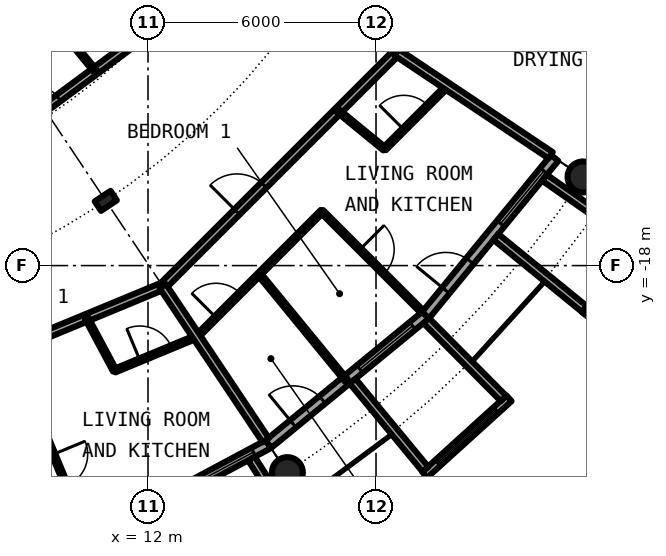
"""IFC4 building model, lengths in metres.
Left out: names, types, materials, properties, quantities, classifications, styles, units other than length and angle.
Written with IfcOpenShell. Run it as: python <this file> out.ifc"""

import sys

from ifc_helpers import new_model, si_unit, direction, frame, frame_2d, origin, origin_2d, place, context, subcontext, project, spatial, rectangle, circle, hollow_circle, i_section, extrude, element, fill, save


model = new_model("IFC4")
c1 = context("Model", 3, precision=1e-05, world=origin(), true_north=direction((0.0, 1.0)))
c2 = subcontext(c1, "Body", "Model", "MODEL_VIEW")
j1 = project(units=[si_unit("LENGTHUNIT", "METRE"), si_unit("PLANEANGLEUNIT", "RADIAN")], contexts=[c1])
p1 = place(None, origin())
s1 = spatial("IfcSite", under=j1, at=p1, CompositionType="ELEMENT")
p2 = place(p1, origin())
s2 = spatial("IfcBuilding", under=s1, at=p2, CompositionType="ELEMENT")
p3 = place(p2, frame((0.0, 0.0, 170.75)))
s3 = spatial("IfcBuildingStorey", under=s2, at=p3, CompositionType="ELEMENT", Elevation=170.75)
for number, where, z_axis, x_axis in (
    (1, (15.667, -23.448, 0.0), (0.0, 0.0, 1.0), (1.0, 0.0, 0.0)),
    (2, (23.448, -15.667, 0.0), (0.0, 0.0, 1.0), (1.0, 0.0, 0.0)),
):
    element("IfcColumn", number, at=place(p3, frame(where, z_axis=z_axis, x_axis=x_axis)), inside=s3, PredefinedType="COLUMN", context=c2, shape_type="SweptSolid", body=[
        extrude(hollow_circle(Radius=0.406, WallThickness=0.04, at=origin_2d()), origin(), (0.0, 0.0, 1.0), 3.05),
    ])
p4 = place(p3, frame((10.889, -16.297, 0.0), z_axis=(0.0, 0.0, 1.0), x_axis=(0.55557023302, -0.831469612303, 0.0)))
e3 = element("IfcColumn", 3, at=p4, inside=s3, PredefinedType="COLUMN", context=c2, shape_type="SweptSolid", body=[
    extrude(i_section(OverallWidth=0.3, OverallDepth=0.5, WebThickness=0.014, FlangeThickness=0.028, FilletRadius=0.027, at=origin_2d()), origin(), (0.0, 0.0, 1.0), 3.05),
])
p5 = place(p3, frame((10.447, -25.222, 0.0), z_axis=(0.0, 0.0, 1.0), x_axis=(0.881915646801, 0.471407246368, 0.0)))
e4 = element("IfcWall", 4, at=p5, inside=s3, PredefinedType="SOLIDWALL", context=c2, shape_type="SweptSolid", body=[
    extrude(rectangle(XDim=5.352, YDim=0.25, at=frame_2d((2.676, 0.0))), origin(), (0.0, 0.0, 1.0), 2.7),
])
p6 = place(p5, frame((0.841, 0.0, 0.0)))
e5 = element("IfcOpeningElement", 5, at=p6, cuts=e4, PredefinedType="OPENING", context=c2, shape_type="SweptSolid", body=[
    extrude(rectangle(XDim=1.0, YDim=2.2, at=frame_2d((0.5, 1.1))), frame((0.0, 0.135, 0.0), z_axis=(0.0, -1.0, 0.0), x_axis=(1.0, 0.0, 0.0)), (0.0, 0.0, 1.0), 0.27),
])
p7 = place(p5, frame((3.111, 0.0, 0.3)))
e6 = element("IfcOpeningElement", 6, at=p7, cuts=e4, PredefinedType="OPENING", context=c2, shape_type="SweptSolid", body=[
    extrude(rectangle(XDim=1.8, YDim=2.1, at=frame_2d((0.9, 1.05))), frame((0.0, 0.135, 0.0), z_axis=(0.0, -1.0, 0.0), x_axis=(1.0, 0.0, 0.0)), (0.0, 0.0, 1.0), 0.27),
])
p8 = place(p3, frame((14.722, -23.079, -0.03), z_axis=(0.0, 0.0, 1.0), x_axis=(0.537572179146, -0.843217737129, 0.0)))
e7 = element("IfcWall", 7, at=p8, inside=s3, PredefinedType="SOLIDWALL", context=c2, shape_type="SweptSolid", body=[
    extrude(rectangle(XDim=2.924, YDim=0.2, at=frame_2d((1.462, 0.0))), origin(), (0.0, 0.0, 1.0), 2.73),
])
p9 = place(p3, frame((15.167, -22.699, 0.0), z_axis=(0.0, 0.0, 1.0), x_axis=(0.773019449054, 0.634382322723, 0.0)))
e8 = element("IfcWall", 8, at=p9, inside=s3, PredefinedType="SOLIDWALL", context=c2, shape_type="SweptSolid", body=[
    extrude(rectangle(XDim=5.352, YDim=0.25, at=frame_2d((2.676, 0.0))), origin(), (0.0, 0.0, 1.0), 2.7),
])
p10 = place(p9, frame((0.841, 0.0, 0.0)))
e9 = element("IfcOpeningElement", 9, at=p10, cuts=e8, PredefinedType="OPENING", context=c2, shape_type="SweptSolid", body=[
    extrude(rectangle(XDim=1.0, YDim=2.2, at=frame_2d((0.5, 1.1))), frame((0.0, 0.135, 0.0), z_axis=(0.0, -1.0, 0.0), x_axis=(1.0, 0.0, 0.0)), (0.0, 0.0, 1.0), 0.27),
])
p11 = place(p9, frame((3.111, 0.0, 0.3)))
e10 = element("IfcOpeningElement", 10, at=p11, cuts=e8, PredefinedType="OPENING", context=c2, shape_type="SweptSolid", body=[
    extrude(rectangle(XDim=1.8, YDim=2.1, at=frame_2d((0.9, 1.05))), frame((0.0, 0.135, 0.0), z_axis=(0.0, -1.0, 0.0), x_axis=(1.0, 0.0, 0.0)), (0.0, 0.0, 1.0), 0.27),
])
p12 = place(p3, frame((19.282, -23.503, -0.03), z_axis=(0.0, 0.0, 1.0), x_axis=(0.740998365753, 0.671506829416, 0.0)))
e11 = element("IfcWall", 11, at=p12, inside=s3, PredefinedType="SOLIDWALL", context=c2, shape_type="SweptSolid", body=[
    extrude(rectangle(XDim=2.993, YDim=0.2, at=frame_2d((1.497, 0.0))), origin(), (0.0, 0.0, 1.0), 2.73),
])
p13 = place(p12, frame((0.457, 0.0, 0.33)))
e12 = element("IfcOpeningElement", 12, at=p13, cuts=e11, PredefinedType="OPENING", context=c2, shape_type="SweptSolid", body=[
    extrude(circle(Radius=1.04, at=frame_2d((1.04, 1.04))), frame((0.0, 0.11, 0.0), z_axis=(0.0, -1.0, 0.0), x_axis=(1.0, 0.0, 0.0)), (0.0, 0.0, 1.0), 0.22),
])
p14 = place(p3, frame((17.384, -21.041, -0.03), z_axis=(0.0, 0.0, 1.0), x_axis=(0.63709551667, -0.770784861449, 0.0)))
e13 = element("IfcWall", 13, at=p14, inside=s3, PredefinedType="SOLIDWALL", context=c2, shape_type="SweptSolid", body=[
    extrude(rectangle(XDim=3.006, YDim=0.2, at=frame_2d((1.503, 0.0))), origin(), (0.0, 0.0, 1.0), 2.73),
])
p15 = place(p3, frame((19.323, -19.45, -0.03), z_axis=(0.0, 0.0, 1.0), x_axis=(0.704476739375, -0.709727076896, 0.0)))
e14 = element("IfcWall", 14, at=p15, inside=s3, PredefinedType="SOLIDWALL", context=c2, shape_type="SweptSolid", body=[
    extrude(rectangle(XDim=2.883, YDim=0.2, at=frame_2d((1.441, 0.0))), origin(), (0.0, 0.0, 1.0), 2.73),
])
p16 = place(p3, frame((19.304, -19.304, 0.0), z_axis=(0.0, 0.0, 1.0), x_axis=(0.634382322723, 0.773019449054, 0.0)))
e15 = element("IfcWall", 15, at=p16, inside=s3, PredefinedType="SOLIDWALL", context=c2, shape_type="SweptSolid", body=[
    extrude(rectangle(XDim=5.352, YDim=0.25, at=frame_2d((2.676, 0.0))), origin(), (0.0, 0.0, 1.0), 2.7),
])
p17 = place(p16, frame((0.841, 0.0, 0.0)))
e16 = element("IfcOpeningElement", 16, at=p17, cuts=e15, PredefinedType="OPENING", context=c2, shape_type="SweptSolid", body=[
    extrude(rectangle(XDim=1.0, YDim=2.2, at=frame_2d((0.5, 1.1))), frame((0.0, 0.135, 0.0), z_axis=(0.0, -1.0, 0.0), x_axis=(1.0, 0.0, 0.0)), (0.0, 0.0, 1.0), 0.27),
])
p18 = place(p16, frame((3.111, 0.0, 0.3)))
e17 = element("IfcOpeningElement", 17, at=p18, cuts=e15, PredefinedType="OPENING", context=c2, shape_type="SweptSolid", body=[
    extrude(rectangle(XDim=1.8, YDim=2.1, at=frame_2d((0.9, 1.05))), frame((0.0, 0.135, 0.0), z_axis=(0.0, -1.0, 0.0), x_axis=(1.0, 0.0, 0.0)), (0.0, 0.0, 1.0), 0.27),
])
p19 = place(p3, frame((23.497, -19.289, -0.03), z_axis=(0.0, 0.0, 1.0), x_axis=(0.602806268067, 0.797887588059, 0.0)))
e18 = element("IfcWall", 18, at=p19, inside=s3, PredefinedType="SOLIDWALL", context=c2, shape_type="SweptSolid", body=[
    extrude(rectangle(XDim=2.447, YDim=0.2, at=frame_2d((1.223, 0.0))), origin(), (0.0, 0.0, 1.0), 2.73),
])
p20 = place(p19, frame((0.183, 0.0, 0.33)))
e19 = element("IfcOpeningElement", 19, at=p20, cuts=e18, PredefinedType="OPENING", context=c2, shape_type="SweptSolid", body=[
    extrude(circle(Radius=1.04, at=frame_2d((1.04, 1.04))), frame((0.0, 0.11, 0.0), z_axis=(0.0, -1.0, 0.0), x_axis=(1.0, 0.0, 0.0)), (0.0, 0.0, 1.0), 0.22),
])
p21 = place(p3, frame((21.155, -17.246, -0.03), z_axis=(0.0, 0.0, 1.0), x_axis=(0.775179004516, -0.631741648902, 0.0)))
e20 = element("IfcWall", 20, at=p21, inside=s3, PredefinedType="SOLIDWALL", context=c2, shape_type="SweptSolid", body=[
    extrude(rectangle(XDim=3.006, YDim=0.2, at=frame_2d((1.503, 0.0))), origin(), (0.0, 0.0, 1.0), 2.73),
])
p22 = place(p3, frame((22.433, -15.688, -0.03), z_axis=(0.0, 0.0, 1.0), x_axis=(0.819373043115, -0.573260687834, 0.0)))
e21 = element("IfcWall", 21, at=p22, inside=s3, PredefinedType="SOLIDWALL", context=c2, shape_type="SweptSolid", body=[
    extrude(rectangle(XDim=2.925, YDim=0.2, at=frame_2d((1.463, 0.0))), origin(), (0.0, 0.0, 1.0), 2.73),
])
p23 = place(p3, frame((11.124, -20.764, 0.0), z_axis=(0.0, 0.0, 1.0), x_axis=(0.923938991376, 0.382539854414, 0.0)))
e22 = element("IfcWall", 22, at=p23, inside=s3, PredefinedType="PARTITIONING", context=c2, shape_type="SweptSolid", body=[
    extrude(rectangle(XDim=2.331, YDim=0.1, at=frame_2d((1.166, 0.0))), origin(), (0.0, 0.0, 1.0), 2.7),
])
p24 = place(p23, frame((0.716, 0.0, 0.0)))
e23 = element("IfcOpeningElement", 23, at=p24, cuts=e22, PredefinedType="OPENING", context=c2, shape_type="SweptSolid", body=[
    extrude(rectangle(XDim=0.9, YDim=2.3, at=frame_2d((0.45, 1.15))), frame((0.0, 0.06, 0.0), z_axis=(0.0, -1.0, 0.0), x_axis=(1.0, 0.0, 0.0)), (0.0, 0.0, 1.0), 0.12),
])
p25 = place(p3, frame((13.285, -19.869, 0.0), z_axis=(0.0, 0.0, 1.0), x_axis=(0.706923494552, 0.707290020325, 0.0)))
e24 = element("IfcWall", 24, at=p25, inside=s3, PredefinedType="PARTITIONING", context=c2, shape_type="SweptSolid", body=[
    extrude(rectangle(XDim=4.663, YDim=0.1, at=frame_2d((2.331, 0.0))), origin(), (0.0, 0.0, 1.0), 2.7),
])
p26 = place(p25, frame((0.712, 0.0, 0.0)))
e25 = element("IfcOpeningElement", 25, at=p26, cuts=e24, PredefinedType="OPENING", context=c2, shape_type="SweptSolid", body=[
    extrude(rectangle(XDim=0.9, YDim=2.3, at=frame_2d((0.45, 1.15))), frame((0.0, 0.06, 0.0), z_axis=(0.0, -1.0, 0.0), x_axis=(1.0, 0.0, 0.0)), (0.0, 0.0, 1.0), 0.12),
])
p27 = place(p3, frame((18.224, -14.927, 0.0), z_axis=(0.0, 0.0, 1.0), x_axis=(0.706897299114, 0.707316201218, 0.0)))
e26 = element("IfcWall", 26, at=p27, inside=s3, PredefinedType="PARTITIONING", context=c2, shape_type="SweptSolid", body=[
    extrude(rectangle(XDim=2.331, YDim=0.1, at=frame_2d((1.166, 0.0))), origin(), (0.0, 0.0, 1.0), 2.7),
])
p28 = place(p27, frame((0.716, 0.0, 0.0)))
e27 = element("IfcOpeningElement", 27, at=p28, cuts=e26, PredefinedType="OPENING", context=c2, shape_type="SweptSolid", body=[
    extrude(rectangle(XDim=0.9, YDim=2.3, at=frame_2d((0.45, 1.15))), frame((0.0, 0.06, 0.0), z_axis=(0.0, -1.0, 0.0), x_axis=(1.0, 0.0, 0.0)), (0.0, 0.0, 1.0), 0.12),
])
p29 = place(p3, frame((18.542, -12.389, 0.0), z_axis=(0.0, 0.0, 1.0), x_axis=(0.465605550524, 0.884992356646, 0.0)))
e28 = element("IfcWall", 28, at=p29, inside=s3, PredefinedType="PARTITIONING", context=c2, shape_type="SweptSolid", body=[
    extrude(rectangle(XDim=1.643, YDim=0.2, at=frame_2d((0.821, 0.0))), origin(), (0.0, 0.0, 1.0), 2.7),
])
p30 = place(p3, frame((4.351, -21.872, 0.0), z_axis=(0.0, 0.0, 1.0), x_axis=(0.923825356298, 0.382814199136, 0.0)))
e29 = element("IfcWall", 29, at=p30, inside=s3, PredefinedType="PARTITIONING", context=c2, shape_type="SweptSolid", body=[
    extrude(rectangle(XDim=8.704, YDim=0.2, at=frame_2d((4.352, 0.0))), origin(), (0.0, 0.0, 1.0), 2.7),
])
p31 = place(p30, frame((2.763, 0.0, 0.0)))
e30 = element("IfcOpeningElement", 30, at=p31, cuts=e29, PredefinedType="OPENING", context=c2, shape_type="SweptSolid", body=[
    extrude(rectangle(XDim=1.0, YDim=2.3, at=frame_2d((0.5, 1.15))), frame((0.0, 0.11, 0.0), z_axis=(0.0, -1.0, 0.0), x_axis=(1.0, 0.0, 0.0)), (0.0, 0.0, 1.0), 0.22),
])
p32 = place(p3, frame((12.389, -18.542, 0.0), z_axis=(0.0, 0.0, 1.0), x_axis=(0.707106781187, 0.707106781187, 0.0)))
e31 = element("IfcWall", 31, at=p32, inside=s3, PredefinedType="PARTITIONING", context=c2, shape_type="SweptSolid", body=[
    extrude(rectangle(XDim=8.702, YDim=0.2, at=frame_2d((4.351, 0.0))), origin(), (0.0, 0.0, 1.0), 2.7),
])
p33 = place(p32, frame((2.763, 0.0, 0.0)))
e32 = element("IfcOpeningElement", 32, at=p33, cuts=e31, PredefinedType="OPENING", context=c2, shape_type="SweptSolid", body=[
    extrude(rectangle(XDim=1.0, YDim=2.3, at=frame_2d((0.5, 1.15))), frame((0.0, 0.11, 0.0), z_axis=(0.0, -1.0, 0.0), x_axis=(1.0, 0.0, 0.0)), (0.0, 0.0, 1.0), 0.22),
])
p34 = place(p3, frame((5.137, -16.938, 0.0), z_axis=(0.0, 0.0, 1.0), x_axis=(0.803229232922, 0.595670042371, 0.0)))
e33 = element("IfcWall", 33, at=p34, inside=s3, PredefinedType="PARTITIONING", context=c2, shape_type="SweptSolid", body=[
    extrude(rectangle(XDim=10.224, YDim=0.2, at=frame_2d((5.112, 0.0))), origin(), (0.0, 0.0, 1.0), 2.7),
])
p35 = place(p34, frame((4.612, 0.0, 0.0)))
e34 = element("IfcOpeningElement", 34, at=p35, cuts=e33, PredefinedType="OPENING", context=c2, shape_type="SweptSolid", body=[
    extrude(rectangle(XDim=1.0, YDim=2.3, at=frame_2d((0.5, 1.15))), frame((0.0, 0.11, 0.0), z_axis=(0.0, -1.0, 0.0), x_axis=(1.0, 0.0, 0.0)), (0.0, 0.0, 1.0), 0.22),
])
p36 = place(p3, frame((4.908, -5.959, 0.0), z_axis=(0.0, 0.0, 1.0), x_axis=(0.636115614725, -0.771593756262, 0.0)))
e35 = element("IfcWall", 35, at=p36, inside=s3, PredefinedType="PARTITIONING", context=c2, shape_type="SweptSolid", body=[
    extrude(rectangle(XDim=8.967, YDim=0.1, at=frame_2d((4.483, 0.0))), origin(), (0.0, 0.0, 1.0), 2.7),
])
p37 = place(p36, frame((6.4, 0.0, 0.0)))
e36 = element("IfcOpeningElement", 36, at=p37, cuts=e35, PredefinedType="OPENING", context=c2, shape_type="SweptSolid", body=[
    extrude(rectangle(XDim=0.9, YDim=2.3, at=frame_2d((0.45, 1.15))), frame((0.0, 0.06, 0.0), z_axis=(0.0, -1.0, 0.0), x_axis=(1.0, 0.0, 0.0)), (0.0, 0.0, 1.0), 0.12),
])
p38 = place(p36, frame((1.917, 0.0, 0.0)))
e37 = element("IfcOpeningElement", 37, at=p38, cuts=e35, PredefinedType="OPENING", context=c2, shape_type="SweptSolid", body=[
    extrude(rectangle(XDim=0.9, YDim=2.3, at=frame_2d((0.45, 1.15))), frame((0.0, 0.06, 0.0), z_axis=(0.0, -1.0, 0.0), x_axis=(1.0, 0.0, 0.0)), (0.0, 0.0, 1.0), 0.12),
])
p39 = place(p3, frame((8.97, -21.656, 0.0), z_axis=(0.0, 0.0, 1.0), x_axis=(0.382669377748, -0.923885353999, 0.0)))
e38 = element("IfcWall", 38, at=p39, inside=s3, PredefinedType="PARTITIONING", context=c2, shape_type="SweptSolid", body=[
    extrude(rectangle(XDim=3.734, YDim=0.1, at=frame_2d((1.867, 0.0))), origin(), (0.0, 0.0, 1.0), 2.7),
])
p40 = place(p39, frame((1.417, 0.0, 0.0)))
e39 = element("IfcOpeningElement", 39, at=p40, cuts=e38, PredefinedType="OPENING", context=c2, shape_type="SweptSolid", body=[
    extrude(rectangle(XDim=0.9, YDim=2.3, at=frame_2d((0.45, 1.15))), frame((0.0, 0.06, 0.0), z_axis=(0.0, -1.0, 0.0), x_axis=(1.0, 0.0, 0.0)), (0.0, 0.0, 1.0), 0.12),
])
p41 = place(p3, frame((10.38, -19.374, 0.0), z_axis=(0.0, 0.0, 1.0), x_axis=(0.472002235476, -0.881597351236, 0.0)))
e40 = element("IfcWall", 40, at=p41, inside=s3, PredefinedType="PARTITIONING", context=c2, shape_type="SweptSolid", body=[
    extrude(rectangle(XDim=1.577, YDim=0.1, at=frame_2d((0.788, 0.0))), origin(), (0.0, 0.0, 1.0), 2.7),
])
p42 = place(p3, frame((12.389, -18.542, 0.0), z_axis=(0.0, 0.0, 1.0), x_axis=(0.55569370664, -0.831387096605, 0.0)))
e41 = element("IfcWall", 41, at=p42, inside=s3, PredefinedType="PARTITIONING", context=c2, shape_type="SweptSolid", body=[
    extrude(rectangle(XDim=4.875, YDim=0.2, at=frame_2d((2.438, 0.0))), origin(), (0.0, 0.0, 1.0), 2.7),
])
p43 = place(p3, frame((14.927, -18.224, 0.0), z_axis=(0.0, 0.0, 1.0), x_axis=(0.633737383709, -0.773548271597, 0.0)))
e42 = element("IfcWall", 42, at=p43, inside=s3, PredefinedType="PARTITIONING", context=c2, shape_type="SweptSolid", body=[
    extrude(rectangle(XDim=3.618, YDim=0.1, at=frame_2d((1.809, 0.0))), origin(), (0.0, 0.0, 1.0), 2.7),
])
p44 = place(p3, frame((16.575, -16.575, 0.0), z_axis=(0.0, 0.0, 1.0), x_axis=(0.707106781187, -0.707106781187, 0.0)))
e43 = element("IfcWall", 43, at=p44, inside=s3, PredefinedType="PARTITIONING", context=c2, shape_type="SweptSolid", body=[
    extrude(rectangle(XDim=3.735, YDim=0.1, at=frame_2d((1.868, 0.0))), origin(), (0.0, 0.0, 1.0), 2.7),
])
p45 = place(p44, frame((1.417, 0.0, 0.0)))
e44 = element("IfcOpeningElement", 44, at=p45, cuts=e43, PredefinedType="OPENING", context=c2, shape_type="SweptSolid", body=[
    extrude(rectangle(XDim=0.9, YDim=2.3, at=frame_2d((0.45, 1.15))), frame((0.0, 0.06, 0.0), z_axis=(0.0, -1.0, 0.0), x_axis=(1.0, 0.0, 0.0)), (0.0, 0.0, 1.0), 0.12),
])
p46 = place(p3, frame((17.001, -13.93, 0.0), z_axis=(0.0, 0.0, 1.0), x_axis=(0.773633255921, -0.633633636523, 0.0)))
e45 = element("IfcWall", 45, at=p46, inside=s3, PredefinedType="PARTITIONING", context=c2, shape_type="SweptSolid", body=[
    extrude(rectangle(XDim=1.578, YDim=0.1, at=frame_2d((0.789, 0.0))), origin(), (0.0, 0.0, 1.0), 2.7),
])
p47 = place(p3, frame((18.542, -12.389, 0.0), z_axis=(0.0, 0.0, 1.0), x_axis=(0.831387096605, -0.55569370664, 0.0)))
e46 = element("IfcWall", 46, at=p47, inside=s3, PredefinedType="PARTITIONING", context=c2, shape_type="SweptSolid", body=[
    extrude(rectangle(XDim=4.875, YDim=0.2, at=frame_2d((2.438, 0.0))), origin(), (0.0, 0.0, 1.0), 2.7),
])
p48 = place(p7, origin())
e47 = element("IfcWindow", 47, at=p48, inside=s3, PartitioningType="SINGLE_PANEL", PredefinedType="WINDOW", context=c2, shape_type="SweptSolid", body=[
    extrude(rectangle(XDim=1.8, YDim=2.1, at=frame_2d((0.9, 1.05))), frame((0.0, 0.03, 0.0), z_axis=(0.0, -1.0, 0.0), x_axis=(1.0, 0.0, 0.0)), (0.0, 0.0, 1.0), 0.06),
])
fill(e6, e47)
p49 = place(p10, origin())
e48 = element("IfcDoor", 48, at=p49, inside=s3, OperationType="SINGLE_SWING_LEFT", PredefinedType="DOOR", context=c2, shape_type="SweptSolid", body=[
    extrude(rectangle(XDim=1.0, YDim=2.2, at=frame_2d((0.5, 1.1))), frame((0.0, 0.025, 0.0), z_axis=(0.0, -1.0, 0.0), x_axis=(1.0, 0.0, 0.0)), (0.0, 0.0, 1.0), 0.05),
])
fill(e9, e48)
p50 = place(p11, origin())
e49 = element("IfcWindow", 49, at=p50, inside=s3, PartitioningType="SINGLE_PANEL", PredefinedType="WINDOW", context=c2, shape_type="SweptSolid", body=[
    extrude(rectangle(XDim=1.8, YDim=2.1, at=frame_2d((0.9, 1.05))), frame((0.0, 0.03, 0.0), z_axis=(0.0, -1.0, 0.0), x_axis=(1.0, 0.0, 0.0)), (0.0, 0.0, 1.0), 0.06),
])
fill(e10, e49)
p51 = place(p13, origin())
e50 = element("IfcWindow", 50, at=p51, inside=s3, PartitioningType="SINGLE_PANEL", PredefinedType="WINDOW", context=c2, shape_type="SweptSolid", body=[
    extrude(circle(Radius=1.04, at=frame_2d((1.04, 1.04))), frame((0.0, 0.03, 0.0), z_axis=(0.0, -1.0, 0.0), x_axis=(1.0, 0.0, 0.0)), (0.0, 0.0, 1.0), 0.06),
])
fill(e12, e50)
p52 = place(p17, origin())
e51 = element("IfcDoor", 51, at=p52, inside=s3, OperationType="SINGLE_SWING_LEFT", PredefinedType="DOOR", context=c2, shape_type="SweptSolid", body=[
    extrude(rectangle(XDim=1.0, YDim=2.2, at=frame_2d((0.5, 1.1))), frame((0.0, 0.025, 0.0), z_axis=(0.0, -1.0, 0.0), x_axis=(1.0, 0.0, 0.0)), (0.0, 0.0, 1.0), 0.05),
])
fill(e16, e51)
p53 = place(p18, origin())
e52 = element("IfcWindow", 52, at=p53, inside=s3, PartitioningType="SINGLE_PANEL", PredefinedType="WINDOW", context=c2, shape_type="SweptSolid", body=[
    extrude(rectangle(XDim=1.8, YDim=2.1, at=frame_2d((0.9, 1.05))), frame((0.0, 0.03, 0.0), z_axis=(0.0, -1.0, 0.0), x_axis=(1.0, 0.0, 0.0)), (0.0, 0.0, 1.0), 0.06),
])
fill(e17, e52)
p54 = place(p24, origin())
e53 = element("IfcDoor", 53, at=p54, inside=s3, OperationType="SINGLE_SWING_RIGHT", PredefinedType="DOOR", context=c2, shape_type="SweptSolid", body=[
    extrude(rectangle(XDim=0.9, YDim=2.3, at=frame_2d((0.45, 1.15))), frame((0.0, 0.025, 0.0), z_axis=(0.0, -1.0, 0.0), x_axis=(1.0, 0.0, 0.0)), (0.0, 0.0, 1.0), 0.05),
])
fill(e23, e53)
p55 = place(p40, origin())
e54 = element("IfcDoor", 54, at=p55, inside=s3, OperationType="SINGLE_SWING_RIGHT", PredefinedType="DOOR", context=c2, shape_type="SweptSolid", body=[
    extrude(rectangle(XDim=0.9, YDim=2.3, at=frame_2d((0.45, 1.15))), frame((0.0, 0.025, 0.0), z_axis=(0.0, -1.0, 0.0), x_axis=(1.0, 0.0, 0.0)), (0.0, 0.0, 1.0), 0.05),
])
fill(e39, e54)
p56 = place(p33, origin())
e55 = element("IfcDoor", 55, at=p56, inside=s3, OperationType="SINGLE_SWING_LEFT", PredefinedType="DOOR", context=c2, shape_type="SweptSolid", body=[
    extrude(rectangle(XDim=1.0, YDim=2.3, at=frame_2d((0.5, 1.15))), frame((0.0, 0.025, 0.0), z_axis=(0.0, -1.0, 0.0), x_axis=(1.0, 0.0, 0.0)), (0.0, 0.0, 1.0), 0.05),
])
fill(e32, e55)
p57 = place(p28, origin())
e56 = element("IfcDoor", 56, at=p57, inside=s3, OperationType="SINGLE_SWING_RIGHT", PredefinedType="DOOR", context=c2, shape_type="SweptSolid", body=[
    extrude(rectangle(XDim=0.9, YDim=2.3, at=frame_2d((0.45, 1.15))), frame((0.0, 0.025, 0.0), z_axis=(0.0, -1.0, 0.0), x_axis=(1.0, 0.0, 0.0)), (0.0, 0.0, 1.0), 0.05),
])
fill(e27, e56)
p58 = place(p45, origin())
e57 = element("IfcDoor", 57, at=p58, inside=s3, OperationType="SINGLE_SWING_RIGHT", PredefinedType="DOOR", context=c2, shape_type="SweptSolid", body=[
    extrude(rectangle(XDim=0.9, YDim=2.3, at=frame_2d((0.45, 1.15))), frame((0.0, 0.025, 0.0), z_axis=(0.0, -1.0, 0.0), x_axis=(1.0, 0.0, 0.0)), (0.0, 0.0, 1.0), 0.05),
])
fill(e44, e57)
p59 = place(p26, origin())
e58 = element("IfcDoor", 58, at=p59, inside=s3, OperationType="SINGLE_SWING_LEFT", PredefinedType="DOOR", context=c2, shape_type="SweptSolid", body=[
    extrude(rectangle(XDim=0.9, YDim=2.3, at=frame_2d((0.45, 1.15))), frame((0.0, 0.025, 0.0), z_axis=(0.0, -1.0, 0.0), x_axis=(1.0, 0.0, 0.0)), (0.0, 0.0, 1.0), 0.05),
])
fill(e25, e58)
p60 = place(p35, origin())
e59 = element("IfcDoor", 59, at=p60, inside=s3, OperationType="SINGLE_SWING_RIGHT", PredefinedType="DOOR", context=c2, shape_type="SweptSolid", body=[
    extrude(rectangle(XDim=1.0, YDim=2.3, at=frame_2d((0.5, 1.15))), frame((0.0, 0.025, 0.0), z_axis=(0.0, -1.0, 0.0), x_axis=(1.0, 0.0, 0.0)), (0.0, 0.0, 1.0), 0.05),
])
fill(e34, e59)
save(model, sys.argv[1])
